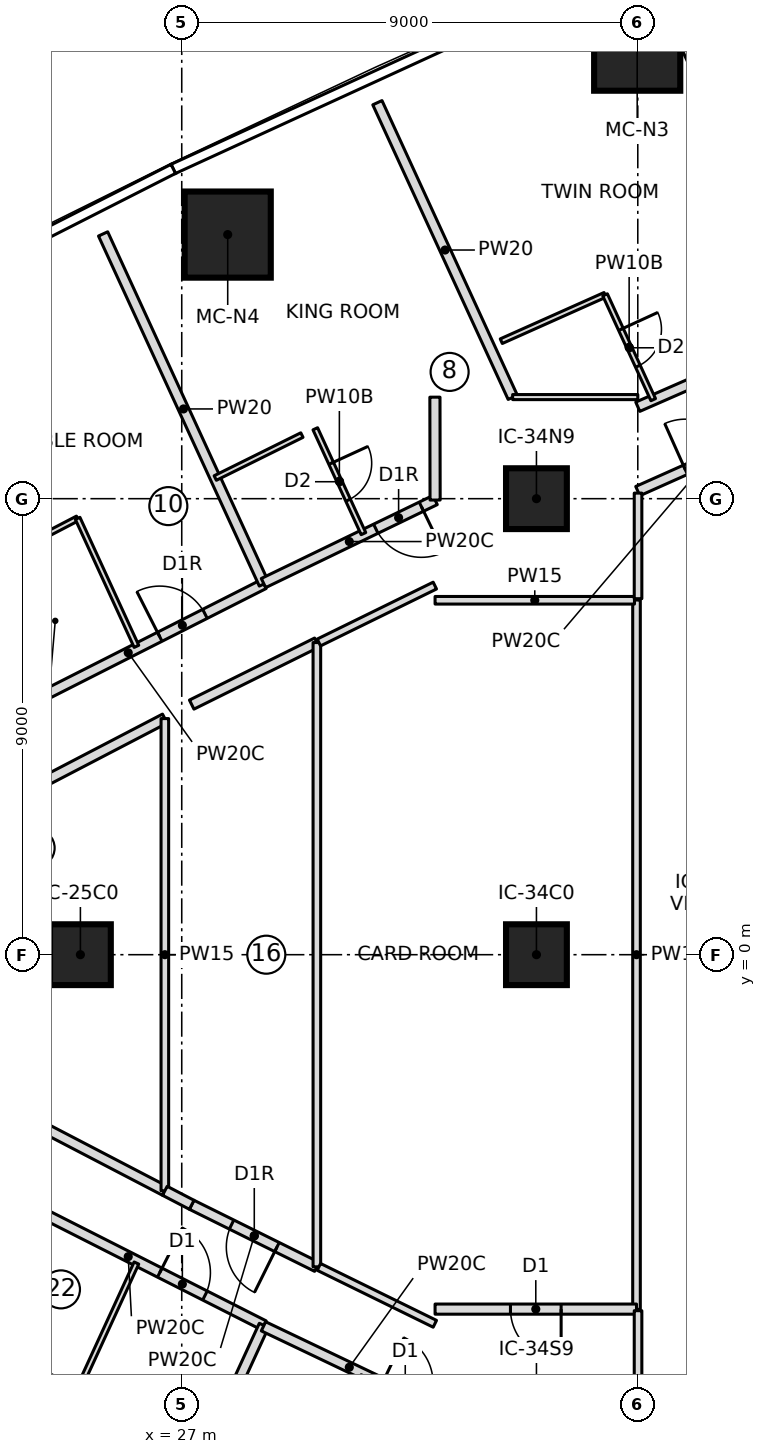
"""IFC4 building model, lengths in metres.
Left out: names, types, materials, properties, quantities, classifications, styles, units other than length and angle.
Written with IfcOpenShell. Run it as: python <this file> out.ifc"""

import sys

from ifc_helpers import new_model, si_unit, direction, frame, frame_2d, origin, origin_2d, place, context, subcontext, project, spatial, rectangle, extrude, element, fill, save


model = new_model("IFC4")
c1 = context("Model", 3, precision=1e-05, world=origin(), true_north=direction((0.0, 1.0)))
c2 = subcontext(c1, "Body", "Model", "MODEL_VIEW")
j1 = project(units=[si_unit("LENGTHUNIT", "METRE"), si_unit("PLANEANGLEUNIT", "RADIAN")], contexts=[c1])
p1 = place(None, origin())
s1 = spatial("IfcSite", under=j1, at=p1, CompositionType="ELEMENT")
p2 = place(p1, origin())
s2 = spatial("IfcBuilding", under=s1, at=p2, CompositionType="ELEMENT")
p3 = place(p2, frame((0.0, 0.0, 109.75)))
s3 = spatial("IfcBuildingStorey", under=s2, at=p3, CompositionType="ELEMENT", Elevation=109.75)
for number, where, z_axis, x_axis in (
    (1, (35.988, 17.902, 0.0), (0.0, 0.0, 1.0), (1.0, 0.0, 0.0)),
    (2, (27.907, 14.212, 0.0), (0.0, 0.0, 1.0), (1.0, 0.0, 0.0)),
):
    element("IfcColumn", number, at=place(p3, frame(where, z_axis=z_axis, x_axis=x_axis)), inside=s3, PredefinedType="COLUMN", context=c2, shape_type="SweptSolid", body=[
        extrude(rectangle(XDim=1.7, YDim=1.7, at=origin_2d()), origin(), (0.0, 0.0, 1.0), 3.55),
    ])
for number, where, z_axis, x_axis in (
    (3, (25.0, 0.0, 0.0), (0.0, 0.0, 1.0), (1.0, 0.0, 0.0)),
    (4, (34.0, 0.0, 0.0), (0.0, 0.0, 1.0), (1.0, 0.0, 0.0)),
    (5, (34.0, 9.0, 0.0), (0.0, 0.0, 1.0), (1.0, 0.0, 0.0)),
):
    element("IfcColumn", number, at=place(p3, frame(where, z_axis=z_axis, x_axis=x_axis)), inside=s3, PredefinedType="COLUMN", context=c2, shape_type="SweptSolid", body=[
        extrude(rectangle(XDim=1.2, YDim=1.2, at=origin_2d()), origin(), (0.0, 0.0, 1.0), 3.55),
    ])
p4 = place(p3, frame((23.266, 4.602, 0.0), z_axis=(0.0, 0.0, 1.0), x_axis=(0.892007141151, 0.452021304958, 0.0)))
e6 = element("IfcWall", 6, at=p4, inside=s3, PredefinedType="PARTITIONING", context=c2, shape_type="SweptSolid", body=[
    extrude(rectangle(XDim=6.004, YDim=0.2, at=frame_2d((3.002, 0.0))), origin(), (0.0, 0.0, 1.0), 3.25),
])
p5 = place(p4, frame((3.7, 0.0, 0.0)))
e7 = element("IfcOpeningElement", 7, at=p5, cuts=e6, PredefinedType="OPENING", context=c2, shape_type="SweptSolid", body=[
    extrude(rectangle(XDim=1.0, YDim=2.1, at=frame_2d((0.5, 1.05))), frame((0.0, 0.11, 0.0), z_axis=(0.0, -1.0, 0.0), x_axis=(1.0, 0.0, 0.0)), (0.0, 0.0, 1.0), 0.22),
])
p6 = place(p3, frame((22.104, 7.132, 0.0), z_axis=(0.0, 0.0, 1.0), x_axis=(0.886865947566, 0.46202682936, 0.0)))
e8 = element("IfcWall", 8, at=p6, inside=s3, PredefinedType="PARTITIONING", context=c2, shape_type="SweptSolid", body=[
    extrude(rectangle(XDim=3.204, YDim=0.1, at=frame_2d((1.602, 0.0))), origin(), (0.0, 0.0, 1.0), 3.25),
])
p7 = place(p6, frame((1.2, 0.0, 0.0)))
e9 = element("IfcOpeningElement", 9, at=p7, cuts=e8, PredefinedType="OPENING", context=c2, shape_type="SweptSolid", body=[
    extrude(rectangle(XDim=0.8, YDim=2.1, at=frame_2d((0.4, 1.05))), frame((0.0, 0.06, 0.0), z_axis=(0.0, -1.0, 0.0), x_axis=(1.0, 0.0, 0.0)), (0.0, 0.0, 1.0), 0.12),
])
p8 = place(p3, frame((24.945, 8.612, 0.0), z_axis=(0.0, 0.0, 1.0), x_axis=(0.417431588167, -0.908708352113, 0.0)))
e10 = element("IfcWall", 10, at=p8, inside=s3, PredefinedType="PARTITIONING", context=c2, shape_type="SweptSolid", body=[
    extrude(rectangle(XDim=2.781, YDim=0.1, at=frame_2d((1.39, 0.0))), origin(), (0.0, 0.0, 1.0), 3.25),
])
p9 = place(p3, frame((28.622, 7.316, 0.0), z_axis=(0.0, 0.0, 1.0), x_axis=(-0.417428513692, 0.908709764422, 0.0)))
e11 = element("IfcWall", 11, at=p9, inside=s3, PredefinedType="PARTITIONING", context=c2, shape_type="SweptSolid", body=[
    extrude(rectangle(XDim=7.603, YDim=0.2, at=frame_2d((3.802, 0.0))), origin(), (0.0, 0.0, 1.0), 3.25),
])
p10 = place(p3, frame((32.0, 8.973, 0.0), z_axis=(0.0, 0.0, 1.0), x_axis=(-0.900216696569, -0.435442188147, 0.0)))
e12 = element("IfcWall", 12, at=p10, inside=s3, PredefinedType="PARTITIONING", context=c2, shape_type="SweptSolid", body=[
    extrude(rectangle(XDim=3.762, YDim=0.2, at=frame_2d((1.881, 0.0))), origin(), (0.0, 0.0, 1.0), 3.25),
])
p11 = place(p10, frame((0.3, 0.0, 0.0)))
e13 = element("IfcOpeningElement", 13, at=p11, cuts=e12, PredefinedType="OPENING", context=c2, shape_type="SweptSolid", body=[
    extrude(rectangle(XDim=1.0, YDim=2.1, at=frame_2d((0.5, 1.05))), frame((0.0, 0.11, 0.0), z_axis=(0.0, -1.0, 0.0), x_axis=(1.0, 0.0, 0.0)), (0.0, 0.0, 1.0), 0.22),
])
p12 = place(p3, frame((27.661, 9.407, 0.0), z_axis=(0.0, 0.0, 1.0), x_axis=(0.895982200486, 0.444089964324, 0.0)))
e14 = element("IfcWall", 14, at=p12, inside=s3, PredefinedType="PARTITIONING", context=c2, shape_type="SweptSolid", body=[
    extrude(rectangle(XDim=1.909, YDim=0.1, at=frame_2d((0.954, 0.0))), origin(), (0.0, 0.0, 1.0), 3.25),
])
p13 = place(p3, frame((29.635, 10.38, 0.0), z_axis=(0.0, 0.0, 1.0), x_axis=(0.417466676952, -0.908692232626, 0.0)))
e15 = element("IfcWall", 15, at=p13, inside=s3, PredefinedType="PARTITIONING", context=c2, shape_type="SweptSolid", body=[
    extrude(rectangle(XDim=2.277, YDim=0.1, at=frame_2d((1.139, 0.0))), origin(), (0.0, 0.0, 1.0), 3.25),
])
p14 = place(p13, frame((0.75, 0.0, 0.0)))
e16 = element("IfcOpeningElement", 16, at=p14, cuts=e15, PredefinedType="OPENING", context=c2, shape_type="SweptSolid", body=[
    extrude(rectangle(XDim=0.8, YDim=2.1, at=frame_2d((0.4, 1.05))), frame((0.0, 0.06, 0.0), z_axis=(0.0, -1.0, 0.0), x_axis=(1.0, 0.0, 0.0)), (0.0, 0.0, 1.0), 0.12),
])
p15 = place(p3, frame((33.532, 11.0, 0.0), z_axis=(0.0, 0.0, 1.0), x_axis=(-0.417441426461, 0.908703832651, 0.0)))
e17 = element("IfcWall", 17, at=p15, inside=s3, PredefinedType="PARTITIONING", context=c2, shape_type="SweptSolid", body=[
    extrude(rectangle(XDim=6.399, YDim=0.2, at=frame_2d((3.2, 0.0))), origin(), (0.0, 0.0, 1.0), 3.25),
])
p16 = place(p3, frame((39.514, 12.353, 0.0), z_axis=(0.0, 0.0, 1.0), x_axis=(-0.916085742373, -0.400982434305, 0.0)))
e18 = element("IfcWall", 18, at=p16, inside=s3, PredefinedType="PARTITIONING", context=c2, shape_type="SweptSolid", body=[
    extrude(rectangle(XDim=3.836, YDim=0.2, at=frame_2d((1.918, 0.0))), origin(), (0.0, 0.0, 1.0), 3.25),
])
p17 = place(p16, frame((0.35, 0.0, 0.0)))
e19 = element("IfcOpeningElement", 19, at=p17, cuts=e18, PredefinedType="OPENING", context=c2, shape_type="SweptSolid", body=[
    extrude(rectangle(XDim=1.0, YDim=2.1, at=frame_2d((0.5, 1.05))), frame((0.0, 0.11, 0.0), z_axis=(0.0, -1.0, 0.0), x_axis=(1.0, 0.0, 0.0)), (0.0, 0.0, 1.0), 0.22),
])
p18 = place(p3, frame((33.306, 12.108, 0.0), z_axis=(0.0, 0.0, 1.0), x_axis=(0.913060453705, 0.407824236504, 0.0)))
e20 = element("IfcWall", 20, at=p18, inside=s3, PredefinedType="PARTITIONING", context=c2, shape_type="SweptSolid", body=[
    extrude(rectangle(XDim=2.243, YDim=0.1, at=frame_2d((1.122, 0.0))), origin(), (0.0, 0.0, 1.0), 3.25),
])
p19 = place(p3, frame((35.354, 13.023, 0.0), z_axis=(0.0, 0.0, 1.0), x_axis=(0.41750734959, -0.908673545911, 0.0)))
e21 = element("IfcWall", 21, at=p19, inside=s3, PredefinedType="PARTITIONING", context=c2, shape_type="SweptSolid", body=[
    extrude(rectangle(XDim=2.277, YDim=0.1, at=frame_2d((1.139, 0.0))), origin(), (0.0, 0.0, 1.0), 3.25),
])
p20 = place(p19, frame((0.75, 0.0, 0.0)))
e22 = element("IfcOpeningElement", 22, at=p20, cuts=e21, PredefinedType="OPENING", context=c2, shape_type="SweptSolid", body=[
    extrude(rectangle(XDim=0.8, YDim=2.1, at=frame_2d((0.4, 1.05))), frame((0.0, 0.06, 0.0), z_axis=(0.0, -1.0, 0.0), x_axis=(1.0, 0.0, 0.0)), (0.0, 0.0, 1.0), 0.12),
])
p21 = place(p3, frame((39.522, 12.334, 0.0), z_axis=(0.0, 0.0, 1.0), x_axis=(-0.417442847913, 0.908703179661, 0.0)))
e23 = element("IfcWall", 23, at=p21, inside=s3, PredefinedType="PARTITIONING", context=c2, shape_type="SweptSolid", body=[
    extrude(rectangle(XDim=7.604, YDim=0.2, at=frame_2d((3.802, 0.0))), origin(), (0.0, 0.0, 1.0), 3.25),
])
p22 = place(p3, frame((23.266, -4.602, 0.0), z_axis=(0.0, 0.0, 1.0), x_axis=(0.892007141151, -0.452021304958, 0.0)))
e24 = element("IfcWall", 24, at=p22, inside=s3, PredefinedType="PARTITIONING", context=c2, shape_type="SweptSolid", body=[
    extrude(rectangle(XDim=6.004, YDim=0.2, at=frame_2d((3.002, 0.0))), origin(), (0.0, 0.0, 1.0), 3.25),
])
p23 = place(p22, frame((3.7, 0.0, 0.0)))
e25 = element("IfcOpeningElement", 25, at=p23, cuts=e24, PredefinedType="OPENING", context=c2, shape_type="SweptSolid", body=[
    extrude(rectangle(XDim=1.0, YDim=2.1, at=frame_2d((0.5, 1.05))), frame((0.0, 0.11, 0.0), z_axis=(0.0, -1.0, 0.0), x_axis=(1.0, 0.0, 0.0)), (0.0, 0.0, 1.0), 0.22),
])
p24 = place(p3, frame((26.106, -6.085, 0.0), z_axis=(0.0, 0.0, 1.0), x_axis=(-0.417431588167, -0.908708352113, 0.0)))
e26 = element("IfcWall", 26, at=p24, inside=s3, PredefinedType="PARTITIONING", context=c2, shape_type="SweptSolid", body=[
    extrude(rectangle(XDim=2.781, YDim=0.1, at=frame_2d((1.39, 0.0))), origin(), (0.0, 0.0, 1.0), 3.25),
])
p25 = place(p3, frame((24.945, -8.612, 0.0), z_axis=(0.0, 0.0, 1.0), x_axis=(-0.886865947566, 0.46202682936, 0.0)))
e27 = element("IfcWall", 27, at=p25, inside=s3, PredefinedType="PARTITIONING", context=c2, shape_type="SweptSolid", body=[
    extrude(rectangle(XDim=3.204, YDim=0.1, at=frame_2d((1.602, 0.0))), origin(), (0.0, 0.0, 1.0), 3.25),
])
p26 = place(p25, frame((1.2, 0.0, 0.0)))
e28 = element("IfcOpeningElement", 28, at=p26, cuts=e27, PredefinedType="OPENING", context=c2, shape_type="SweptSolid", body=[
    extrude(rectangle(XDim=0.8, YDim=2.1, at=frame_2d((0.4, 1.05))), frame((0.0, 0.06, 0.0), z_axis=(0.0, -1.0, 0.0), x_axis=(1.0, 0.0, 0.0)), (0.0, 0.0, 1.0), 0.12),
])
p27 = place(p3, frame((25.448, -14.226, 0.0), z_axis=(0.0, 0.0, 1.0), x_axis=(0.417428513692, 0.908709764422, 0.0)))
e29 = element("IfcWall", 29, at=p27, inside=s3, PredefinedType="PARTITIONING", context=c2, shape_type="SweptSolid", body=[
    extrude(rectangle(XDim=7.603, YDim=0.2, at=frame_2d((3.802, 0.0))), origin(), (0.0, 0.0, 1.0), 3.25),
])
p28 = place(p3, frame((28.613, -7.335, 0.0), z_axis=(0.0, 0.0, 1.0), x_axis=(0.902499429765, -0.430691048518, 0.0)))
e30 = element("IfcWall", 30, at=p28, inside=s3, PredefinedType="PARTITIONING", context=c2, shape_type="SweptSolid", body=[
    extrude(rectangle(XDim=3.753, YDim=0.2, at=frame_2d((1.876, 0.0))), origin(), (0.0, 0.0, 1.0), 3.25),
])
p29 = place(p28, frame((2.6, 0.0, 0.0)))
e31 = element("IfcOpeningElement", 31, at=p29, cuts=e30, PredefinedType="OPENING", context=c2, shape_type="SweptSolid", body=[
    extrude(rectangle(XDim=1.0, YDim=2.1, at=frame_2d((0.5, 1.05))), frame((0.0, 0.11, 0.0), z_axis=(0.0, -1.0, 0.0), x_axis=(1.0, 0.0, 0.0)), (0.0, 0.0, 1.0), 0.22),
])
for number, where, z_axis, x_axis in (
    (32, (23.407, 2.962, 0.0), (0.0, 0.0, 1.0), (0.887, 0.462, 0.0)),
    (33, (26.667, -4.66, 0.0), (0.0, 0.0, 1.0), (-0.887, 0.462, 0.0)),
):
    element("IfcWall", number, at=place(p3, frame(where, z_axis=z_axis, x_axis=x_axis)), inside=s3, PredefinedType="PARTITIONING", context=c2, shape_type="SweptSolid", body=[
        extrude(rectangle(XDim=3.676, YDim=0.2, at=frame_2d((1.838, 0.0))), origin(), (0.0, 0.0, 1.0), 3.25),
    ])
p30 = place(p3, frame((26.667, -4.66, 0.0), z_axis=(0.0, 0.0, 1.0), x_axis=(0.0, 1.0, 0.0)))
e34 = element("IfcWall", 34, at=p30, inside=s3, PredefinedType="PARTITIONING", context=c2, shape_type="SweptSolid", body=[
    extrude(rectangle(XDim=9.32, YDim=0.15, at=frame_2d((4.66, 0.0))), origin(), (0.0, 0.0, 1.0), 3.25),
])
p31 = place(p3, frame((29.667, -6.16, 0.0), z_axis=(0.0, 0.0, 1.0), x_axis=(-0.895945057464, 0.444164895062, 0.0)))
e35 = element("IfcWall", 35, at=p31, inside=s3, PredefinedType="PARTITIONING", context=c2, shape_type="SweptSolid", body=[
    extrude(rectangle(XDim=2.757, YDim=0.2, at=frame_2d((1.378, 0.0))), origin(), (0.0, 0.0, 1.0), 3.25),
])
p32 = place(p31, frame((0.878, 0.0, 0.0)))
e36 = element("IfcOpeningElement", 36, at=p32, cuts=e35, PredefinedType="OPENING", context=c2, shape_type="SweptSolid", body=[
    extrude(rectangle(XDim=1.0, YDim=2.1, at=frame_2d((0.5, 1.05))), frame((0.0, 0.11, 0.0), z_axis=(0.0, -1.0, 0.0), x_axis=(1.0, 0.0, 0.0)), (0.0, 0.0, 1.0), 0.22),
])
p33 = place(p3, frame((27.196, 4.936, 0.0), z_axis=(0.0, 0.0, 1.0), x_axis=(0.895945057464, 0.444164895062, 0.0)))
e37 = element("IfcWall", 37, at=p33, inside=s3, PredefinedType="PARTITIONING", context=c2, shape_type="SweptSolid", body=[
    extrude(rectangle(XDim=2.757, YDim=0.2, at=frame_2d((1.378, 0.0))), origin(), (0.0, 0.0, 1.0), 3.25),
])
p34 = place(p3, frame((29.667, -6.16, 0.0), z_axis=(0.0, 0.0, 1.0), x_axis=(0.0, 1.0, 0.0)))
e38 = element("IfcWall", 38, at=p34, inside=s3, PredefinedType="PARTITIONING", context=c2, shape_type="SweptSolid", body=[
    extrude(rectangle(XDim=12.321, YDim=0.15, at=frame_2d((6.16, 0.0))), origin(), (0.0, 0.0, 1.0), 3.25),
])
p35 = place(p3, frame((35.975, -7.0, 0.0), z_axis=(0.0, 0.0, 1.0), x_axis=(0.0, 1.0, 0.0)))
e39 = element("IfcWall", 39, at=p35, inside=s3, PredefinedType="PARTITIONING", context=c2, shape_type="SweptSolid", body=[
    extrude(rectangle(XDim=14.0, YDim=0.15, at=frame_2d((7.0, 0.0))), origin(), (0.0, 0.0, 1.0), 3.25),
])
p36 = place(p3, frame((36.0, 9.15, 0.0), z_axis=(0.0, 0.0, 1.0), x_axis=(0.913029587861, 0.407893333716, 0.0)))
e40 = element("IfcWall", 40, at=p36, inside=s3, PredefinedType="PARTITIONING", context=c2, shape_type="SweptSolid", body=[
    extrude(rectangle(XDim=3.058, YDim=0.2, at=frame_2d((1.529, 0.0))), origin(), (0.0, 0.0, 1.0), 3.25),
])
p37 = place(p36, frame((1.029, 0.0, 0.0)))
e41 = element("IfcOpeningElement", 41, at=p37, cuts=e40, PredefinedType="OPENING", context=c2, shape_type="SweptSolid", body=[
    extrude(rectangle(XDim=1.0, YDim=2.1, at=frame_2d((0.5, 1.05))), frame((0.0, 0.11, 0.0), z_axis=(0.0, -1.0, 0.0), x_axis=(1.0, 0.0, 0.0)), (0.0, 0.0, 1.0), 0.22),
])
p38 = place(p3, frame((35.975, -6.995, 0.0), z_axis=(0.0, 0.0, 1.0), x_axis=(-1.0, 0.0, 0.0)))
e42 = element("IfcWall", 42, at=p38, inside=s3, PredefinedType="PARTITIONING", context=c2, shape_type="SweptSolid", body=[
    extrude(rectangle(XDim=3.975, YDim=0.2, at=frame_2d((1.988, 0.0))), origin(), (0.0, 0.0, 1.0), 3.25),
])
p39 = place(p38, frame((1.488, 0.0, 0.0)))
e43 = element("IfcOpeningElement", 43, at=p39, cuts=e42, PredefinedType="OPENING", context=c2, shape_type="SweptSolid", body=[
    extrude(rectangle(XDim=1.0, YDim=2.1, at=frame_2d((0.5, 1.05))), frame((0.0, 0.11, 0.0), z_axis=(0.0, -1.0, 0.0), x_axis=(1.0, 0.0, 0.0)), (0.0, 0.0, 1.0), 0.22),
])
p40 = place(p3, frame((36.0, 11.005, 0.0), z_axis=(0.0, 0.0, 1.0), x_axis=(-1.0, 0.0, 0.0)))
e44 = element("IfcWall", 44, at=p40, inside=s3, PredefinedType="PARTITIONING", context=c2, shape_type="SweptSolid", body=[
    extrude(rectangle(XDim=2.47, YDim=0.1, at=frame_2d((1.235, 0.0))), origin(), (0.0, 0.0, 1.0), 3.25),
])
for number, where, z_axis, x_axis in (
    (45, (31.995, -7.285, 0.0), (0.0, 0.0, 1.0), (-0.898, 0.441, 0.0)),
    (46, (29.707, 6.162, 0.0), (0.0, 0.0, 1.0), (0.898, 0.441, 0.0)),
):
    element("IfcWall", number, at=place(p3, frame(where, z_axis=z_axis, x_axis=x_axis)), inside=s3, PredefinedType="PARTITIONING", context=c2, shape_type="SweptSolid", body=[
        extrude(rectangle(XDim=2.549, YDim=0.15, at=frame_2d((1.275, 0.0))), origin(), (0.0, 0.0, 1.0), 3.25),
    ])
p41 = place(p3, frame((32.0, 6.995, 0.0), z_axis=(0.0, 0.0, 1.0), x_axis=(1.0, 0.0, 0.0)))
e47 = element("IfcWall", 47, at=p41, inside=s3, PredefinedType="PARTITIONING", context=c2, shape_type="SweptSolid", body=[
    extrude(rectangle(XDim=3.935, YDim=0.15, at=frame_2d((1.968, 0.0))), origin(), (0.0, 0.0, 1.0), 3.25),
])
for number, where, z_axis, x_axis in (
    (48, (36.005, -9.11, 0.0), (0.0, 0.0, 1.0), (0.0, 1.0, 0.0)),
    (49, (36.005, 7.026, 0.0), (0.0, 0.0, 1.0), (0.0, 1.0, 0.0)),
):
    element("IfcWall", number, at=place(p3, frame(where, z_axis=z_axis, x_axis=x_axis)), inside=s3, PredefinedType="PARTITIONING", context=c2, shape_type="SweptSolid", body=[
        extrude(rectangle(XDim=2.084, YDim=0.15, at=frame_2d((1.042, 0.0))), origin(), (0.0, 0.0, 1.0), 3.25),
    ])
p42 = place(p3, frame((31.997, 11.003, 0.0), z_axis=(0.0, 0.0, 1.0), x_axis=(0.001683296882, -0.999998583255, 0.0)))
e50 = element("IfcWall", 50, at=p42, inside=s3, PredefinedType="PARTITIONING", context=c2, shape_type="SweptSolid", body=[
    extrude(rectangle(XDim=2.031, YDim=0.2, at=frame_2d((1.015, 0.0))), origin(), (0.0, 0.0, 1.0), 3.25),
])
p43 = place(p3, frame((27.196, -4.936, 0.0), z_axis=(0.0, 0.0, 1.0), x_axis=(-0.886948968309, 0.46186743511, 0.0)))
e51 = element("IfcWall", 51, at=p43, inside=s3, PredefinedType="PARTITIONING", context=c2, shape_type="SweptSolid", body=[
    extrude(rectangle(XDim=0.597, YDim=0.2, at=frame_2d((0.299, 0.0))), origin(), (0.0, 0.0, 1.0), 3.25),
])
p44 = place(p5, origin())
e52 = element("IfcDoor", 52, at=p44, inside=s3, OperationType="SINGLE_SWING_RIGHT", PredefinedType="DOOR", context=c2, shape_type="SweptSolid", body=[
    extrude(rectangle(XDim=1.0, YDim=2.1, at=frame_2d((0.5, 1.05))), frame((0.0, 0.025, 0.0), z_axis=(0.0, -1.0, 0.0), x_axis=(1.0, 0.0, 0.0)), (0.0, 0.0, 1.0), 0.05),
])
fill(e7, e52)
p45 = place(p14, origin())
e53 = element("IfcDoor", 53, at=p45, inside=s3, OperationType="SINGLE_SWING_LEFT", PredefinedType="DOOR", context=c2, shape_type="SweptSolid", body=[
    extrude(rectangle(XDim=0.8, YDim=2.1, at=frame_2d((0.4, 1.05))), frame((0.0, 0.025, 0.0), z_axis=(0.0, -1.0, 0.0), x_axis=(1.0, 0.0, 0.0)), (0.0, 0.0, 1.0), 0.05),
])
fill(e16, e53)
p46 = place(p11, origin())
e54 = element("IfcDoor", 54, at=p46, inside=s3, OperationType="SINGLE_SWING_RIGHT", PredefinedType="DOOR", context=c2, shape_type="SweptSolid", body=[
    extrude(rectangle(XDim=1.0, YDim=2.1, at=frame_2d((0.5, 1.05))), frame((0.0, 0.025, 0.0), z_axis=(0.0, -1.0, 0.0), x_axis=(1.0, 0.0, 0.0)), (0.0, 0.0, 1.0), 0.05),
])
fill(e13, e54)
p47 = place(p20, origin())
e55 = element("IfcDoor", 55, at=p47, inside=s3, OperationType="SINGLE_SWING_LEFT", PredefinedType="DOOR", context=c2, shape_type="SweptSolid", body=[
    extrude(rectangle(XDim=0.8, YDim=2.1, at=frame_2d((0.4, 1.05))), frame((0.0, 0.025, 0.0), z_axis=(0.0, -1.0, 0.0), x_axis=(1.0, 0.0, 0.0)), (0.0, 0.0, 1.0), 0.05),
])
fill(e22, e55)
p48 = place(p23, origin())
e56 = element("IfcDoor", 56, at=p48, inside=s3, OperationType="SINGLE_SWING_LEFT", PredefinedType="DOOR", context=c2, shape_type="SweptSolid", body=[
    extrude(rectangle(XDim=1.0, YDim=2.1, at=frame_2d((0.5, 1.05))), frame((0.0, 0.025, 0.0), z_axis=(0.0, -1.0, 0.0), x_axis=(1.0, 0.0, 0.0)), (0.0, 0.0, 1.0), 0.05),
])
fill(e25, e56)
p49 = place(p32, origin())
e57 = element("IfcDoor", 57, at=p49, inside=s3, OperationType="SINGLE_SWING_RIGHT", PredefinedType="DOOR", context=c2, shape_type="SweptSolid", body=[
    extrude(rectangle(XDim=1.0, YDim=2.1, at=frame_2d((0.5, 1.05))), frame((0.0, 0.025, 0.0), z_axis=(0.0, -1.0, 0.0), x_axis=(1.0, 0.0, 0.0)), (0.0, 0.0, 1.0), 0.05),
])
fill(e36, e57)
p50 = place(p37, origin())
e58 = element("IfcDoor", 58, at=p50, inside=s3, OperationType="SINGLE_SWING_LEFT", PredefinedType="DOOR", context=c2, shape_type="SweptSolid", body=[
    extrude(rectangle(XDim=1.0, YDim=2.1, at=frame_2d((0.5, 1.05))), frame((0.0, 0.025, 0.0), z_axis=(0.0, -1.0, 0.0), x_axis=(1.0, 0.0, 0.0)), (0.0, 0.0, 1.0), 0.05),
])
fill(e41, e58)
p51 = place(p39, origin())
e59 = element("IfcDoor", 59, at=p51, inside=s3, OperationType="SINGLE_SWING_LEFT", PredefinedType="DOOR", context=c2, shape_type="SweptSolid", body=[
    extrude(rectangle(XDim=1.0, YDim=2.1, at=frame_2d((0.5, 1.05))), frame((0.0, 0.025, 0.0), z_axis=(0.0, -1.0, 0.0), x_axis=(1.0, 0.0, 0.0)), (0.0, 0.0, 1.0), 0.05),
])
fill(e43, e59)
save(model, sys.argv[1])
